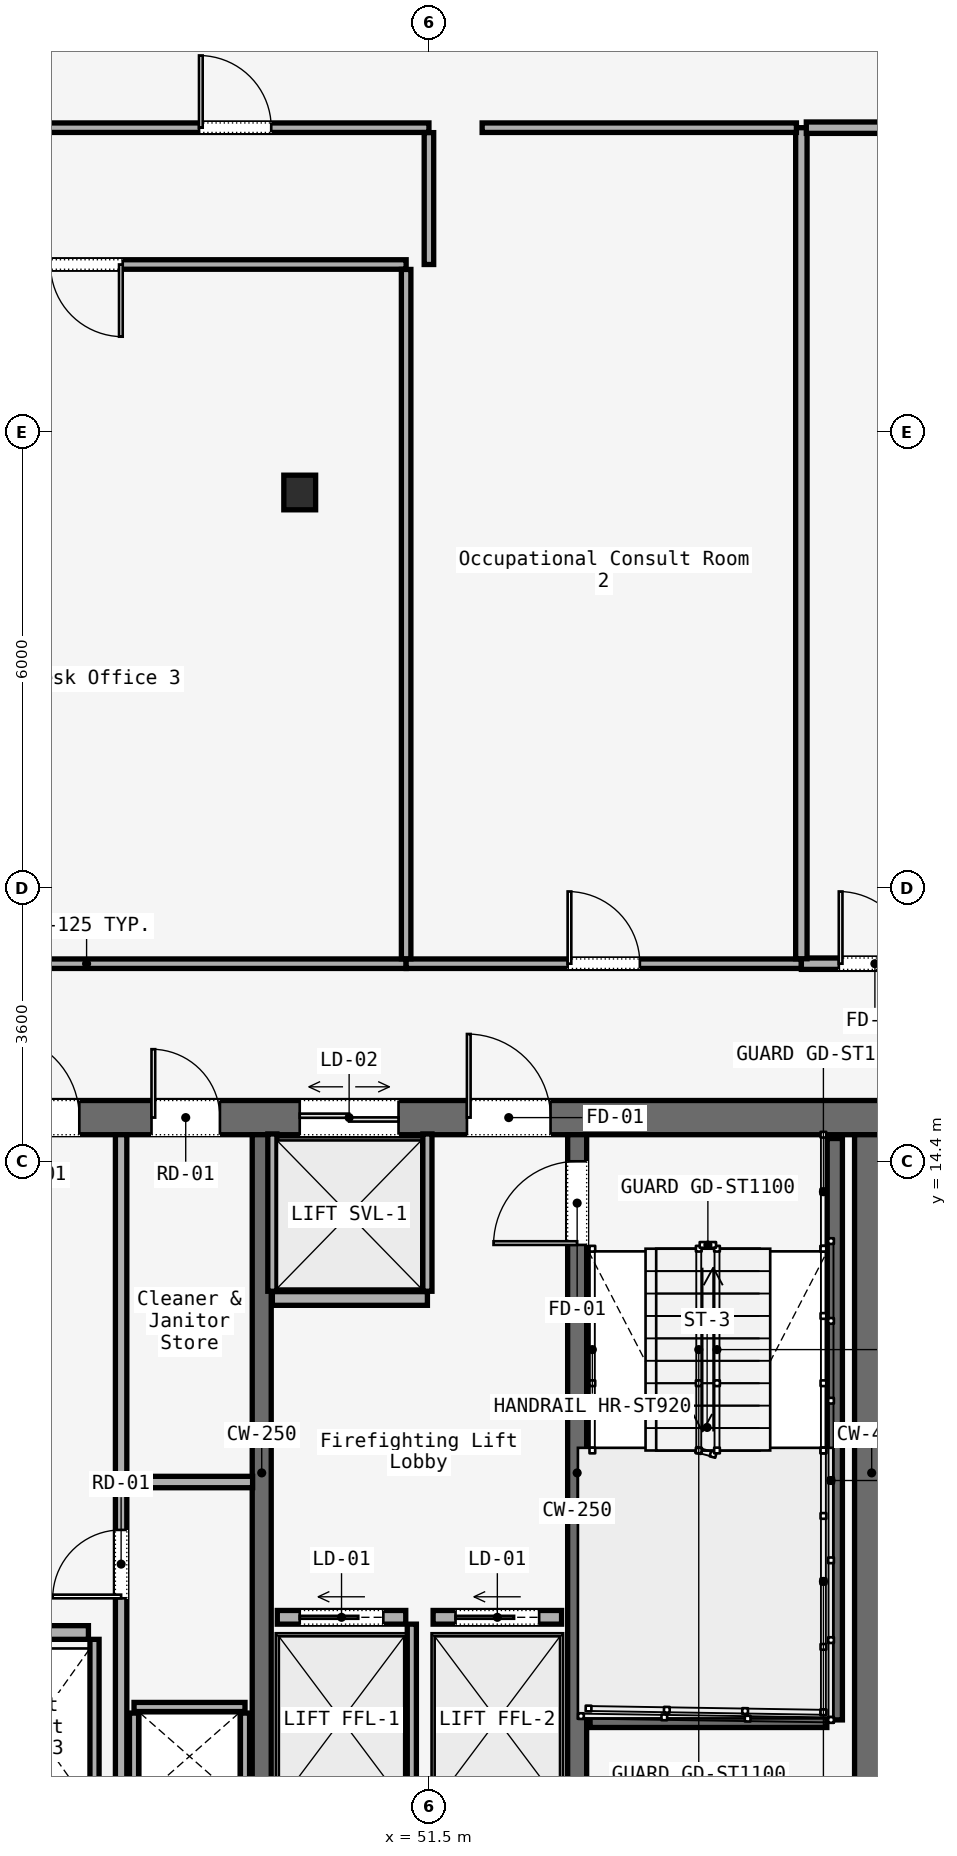
"""IFC4 building model, lengths in metres.
Left out: names, types, materials, properties, quantities, classifications, styles, units other than length and angle.
Written with IfcOpenShell. Run it as: python <this file> out.ifc"""

import sys

from ifc_helpers import new_model, si_unit, direction, frame, frame_2d, origin, origin_2d, place, context, subcontext, project, spatial, rectangle, i_section, extrude, element, fill, save


model = new_model("IFC4")
c1 = context("Model", 3, precision=1e-05, world=origin(), true_north=direction((0.0, 1.0)))
c2 = subcontext(c1, "Body", "Model", "MODEL_VIEW")
j1 = project(units=[si_unit("LENGTHUNIT", "METRE"), si_unit("PLANEANGLEUNIT", "RADIAN")], contexts=[c1])
p1 = place(None, origin())
s1 = spatial("IfcSite", under=j1, at=p1, CompositionType="ELEMENT")
p2 = place(p1, origin())
s2 = spatial("IfcBuilding", under=s1, at=p2, CompositionType="ELEMENT")
p3 = place(p2, frame((0.0, 0.0, 96.8)))
s3 = spatial("IfcBuildingStorey", under=s2, at=p3, CompositionType="ELEMENT", Elevation=96.8)
p4 = place(p3, frame((26.45, 14.975, 0.0), z_axis=(0.0, 0.0, 1.0), x_axis=(1.0, 0.0, 0.0)))
e1 = element("IfcWall", 1, at=p4, inside=s3, PredefinedType="SOLIDWALL", context=c2, shape_type="SweptSolid", body=[
    extrude(rectangle(XDim=31.1, YDim=0.45, at=frame_2d((15.55, 0.0))), origin(), (0.0, 0.0, 1.0), 3.58),
])
p5 = place(p4, frame((1.65, 0.0, 0.0)))
e2 = element("IfcOpeningElement", 2, at=p5, cuts=e1, PredefinedType="OPENING", context=c2, shape_type="SweptSolid", body=[
    extrude(rectangle(XDim=1.1, YDim=2.2, at=frame_2d((0.55, 1.1))), frame((0.0, 0.225, 0.0), z_axis=(0.0, -1.0, 0.0), x_axis=(1.0, 0.0, 0.0)), (0.0, 0.0, 1.0), 0.45),
])
p6 = place(p4, frame((13.65, 0.0, 0.0)))
e3 = element("IfcOpeningElement", 3, at=p6, cuts=e1, PredefinedType="OPENING", context=c2, shape_type="SweptSolid", body=[
    extrude(rectangle(XDim=1.1, YDim=2.2, at=frame_2d((0.55, 1.1))), frame((0.0, 0.225, 0.0), z_axis=(0.0, -1.0, 0.0), x_axis=(1.0, 0.0, 0.0)), (0.0, 0.0, 1.0), 0.45),
])
p7 = place(p4, frame((25.55, 0.0, 0.0)))
e4 = element("IfcOpeningElement", 4, at=p7, cuts=e1, PredefinedType="OPENING", context=c2, shape_type="SweptSolid", body=[
    extrude(rectangle(XDim=1.1, YDim=2.2, at=frame_2d((0.55, 1.1))), frame((0.0, 0.225, 0.0), z_axis=(0.0, -1.0, 0.0), x_axis=(1.0, 0.0, 0.0)), (0.0, 0.0, 1.0), 0.45),
])
p8 = place(p4, frame((10.7, 0.0, 0.0)))
e5 = element("IfcOpeningElement", 5, at=p8, cuts=e1, PredefinedType="OPENING", context=c2, shape_type="SweptSolid", body=[
    extrude(rectangle(XDim=1.4, YDim=2.2, at=frame_2d((0.7, 1.1))), frame((0.0, 0.225, 0.0), z_axis=(0.0, -1.0, 0.0), x_axis=(1.0, 0.0, 0.0)), (0.0, 0.0, 1.0), 0.45),
])
p9 = place(p4, frame((19.35, 0.0, 0.0)))
e6 = element("IfcOpeningElement", 6, at=p9, cuts=e1, PredefinedType="OPENING", context=c2, shape_type="SweptSolid", body=[
    extrude(rectangle(XDim=1.1, YDim=2.2, at=frame_2d((0.55, 1.1))), frame((0.0, 0.225, 0.0), z_axis=(0.0, -1.0, 0.0), x_axis=(1.0, 0.0, 0.0)), (0.0, 0.0, 1.0), 0.45),
])
p10 = place(p4, frame((21.4, 0.0, 0.0)))
e7 = element("IfcOpeningElement", 7, at=p10, cuts=e1, PredefinedType="OPENING", context=c2, shape_type="SweptSolid", body=[
    extrude(rectangle(XDim=0.9, YDim=2.1, at=frame_2d((0.45, 1.05))), frame((0.0, 0.225, 0.0), z_axis=(0.0, -1.0, 0.0), x_axis=(1.0, 0.0, 0.0)), (0.0, 0.0, 1.0), 0.45),
])
p11 = place(p4, frame((23.35, 0.0, 0.0)))
e8 = element("IfcOpeningElement", 8, at=p11, cuts=e1, PredefinedType="OPENING", context=c2, shape_type="SweptSolid", body=[
    extrude(rectangle(XDim=1.3, YDim=2.3, at=frame_2d((0.65, 1.15))), frame((0.0, 0.225, 0.0), z_axis=(0.0, -1.0, 0.0), x_axis=(1.0, 0.0, 0.0)), (0.0, 0.0, 1.0), 0.45),
])
p12 = place(p3, frame((57.325, 5.85, 0.0), z_axis=(0.0, 0.0, 1.0), x_axis=(0.0, 1.0, 0.0)))
e9 = element("IfcWall", 9, at=p12, inside=s3, PredefinedType="SOLIDWALL", context=c2, shape_type="SweptSolid", body=[
    extrude(rectangle(XDim=8.9, YDim=0.45, at=frame_2d((4.45, 0.0))), origin(), (0.0, 0.0, 1.0), 3.58),
])
p13 = place(p3, frame((49.3, 5.85, 0.0), z_axis=(0.0, 0.0, 1.0), x_axis=(0.0, 1.0, 0.0)))
e10 = element("IfcWall", 10, at=p13, inside=s3, PredefinedType="SOLIDWALL", context=c2, shape_type="SweptSolid", body=[
    extrude(rectangle(XDim=8.9, YDim=0.25, at=frame_2d((4.45, 0.0))), origin(), (0.0, 0.0, 1.0), 3.58),
])
p14 = place(p3, frame((53.45, 5.85, 0.0), z_axis=(0.0, 0.0, 1.0), x_axis=(0.0, 1.0, 0.0)))
e11 = element("IfcWall", 11, at=p14, inside=s3, PredefinedType="SOLIDWALL", context=c2, shape_type="SweptSolid", body=[
    extrude(rectangle(XDim=8.9, YDim=0.25, at=frame_2d((4.45, 0.0))), origin(), (0.0, 0.0, 1.0), 3.58),
])
p15 = place(p14, frame((7.45, 0.0, 0.0)))
e12 = element("IfcOpeningElement", 12, at=p15, cuts=e11, PredefinedType="OPENING", context=c2, shape_type="SweptSolid", body=[
    extrude(rectangle(XDim=1.1, YDim=2.2, at=frame_2d((0.55, 1.1))), frame((0.0, 0.125, 0.0), z_axis=(0.0, -1.0, 0.0), x_axis=(1.0, 0.0, 0.0)), (0.0, 0.0, 1.0), 0.25),
])
p16 = place(p3, frame((49.8, 23.2, 0.0), z_axis=(0.0, 0.0, 1.0), x_axis=(1.0, 0.0, 0.0)))
e13 = element("IfcColumn", 13, at=p16, inside=s3, PredefinedType="COLUMN", context=c2, shape_type="SweptSolid", body=[
    extrude(i_section(OverallWidth=0.418, OverallDepth=0.456, WebThickness=0.042, FlangeThickness=0.067, FilletRadius=0.015, at=origin_2d()), origin(), (0.0, 0.0, 1.0), 3.58),
])
p17 = place(p3, frame((56.84, 14.7, 0.0), z_axis=(0.0, 0.0, 1.0), x_axis=(0.0, -1.0, 0.0)))
e14 = element("IfcWall", 14, at=p17, inside=s3, PredefinedType="SOLIDWALL", context=c2, shape_type="SweptSolid", body=[
    extrude(rectangle(XDim=7.65, YDim=0.2, at=frame_2d((3.825, 0.0))), origin(), (0.0, 0.0, 1.0), 3.8),
])
p18 = place(p3, frame((53.62, 7.05, 0.0), z_axis=(0.0, 0.0, 1.0), x_axis=(1.0, 0.0, 0.0)))
e15 = element("IfcWall", 15, at=p18, inside=s3, PredefinedType="SOLIDWALL", context=c2, shape_type="SweptSolid", body=[
    extrude(rectangle(XDim=3.115, YDim=0.2, at=frame_2d((1.558, 0.0))), origin(), (0.0, 0.0, 1.0), 3.8),
])
p19 = place(p3, frame((47.62, 7.22, 0.0), z_axis=(0.0, 0.0, 1.0), x_axis=(1.0, 0.0, 0.0)))
e16 = element("IfcWall", 16, at=p19, inside=s3, PredefinedType="SOLIDWALL", context=c2, shape_type="SweptSolid", body=[
    extrude(rectangle(XDim=1.46, YDim=0.12, at=frame_2d((0.73, 0.0))), origin(), (0.0, 0.0, 1.0), 2.95),
])
for number, where, z_axis, x_axis in (
    (17, (47.62, 6.0, 0.0), (0.0, 0.0, 1.0), (0.0, 1.0, 0.0)),
    (18, (49.08, 6.0, 0.0), (0.0, 0.0, 1.0), (0.0, 1.0, 0.0)),
):
    element("IfcWall", number, at=place(p3, frame(where, z_axis=z_axis, x_axis=x_axis)), inside=s3, PredefinedType="SOLIDWALL", context=c2, shape_type="SweptSolid", body=[
        extrude(rectangle(XDim=1.14, YDim=0.12, at=frame_2d((0.57, 0.0))), origin(), (0.0, 0.0, 1.0), 2.95),
    ])
p20 = place(p3, frame((47.45, 5.9, 0.0), z_axis=(0.0, 0.0, 1.0), x_axis=(0.0, 1.0, 0.0)))
e19 = element("IfcWall", 19, at=p20, inside=s3, PredefinedType="PARTITIONING", context=c2, shape_type="SweptSolid", body=[
    extrude(rectangle(XDim=8.85, YDim=0.15, at=frame_2d((4.425, 0.0))), origin(), (0.0, 0.0, 1.0), 2.95),
])
p21 = place(p20, frame((2.75, 0.0, 0.0)))
e20 = element("IfcOpeningElement", 20, at=p21, cuts=e19, PredefinedType="OPENING", context=c2, shape_type="SweptSolid", body=[
    extrude(rectangle(XDim=0.9, YDim=2.1, at=frame_2d((0.45, 1.05))), frame((0.0, 0.075, 0.0), z_axis=(0.0, -1.0, 0.0), x_axis=(1.0, 0.0, 0.0)), (0.0, 0.0, 1.0), 0.15),
])
p22 = place(p3, frame((47.45, 10.18, 0.0), z_axis=(0.0, 0.0, 1.0), x_axis=(1.0, 0.0, 0.0)))
e21 = element("IfcWall", 21, at=p22, inside=s3, PredefinedType="PARTITIONING", context=c2, shape_type="SweptSolid", body=[
    extrude(rectangle(XDim=1.73, YDim=0.15, at=frame_2d((0.865, 0.0))), origin(), (0.0, 0.0, 1.0), 2.95),
])
p23 = place(p3, frame((45.58, 8.2, 0.0), z_axis=(0.0, 0.0, 1.0), x_axis=(1.0, 0.0, 0.0)))
e22 = element("IfcWall", 22, at=p23, inside=s3, PredefinedType="SOLIDWALL", context=c2, shape_type="SweptSolid", body=[
    extrude(rectangle(XDim=1.44, YDim=0.18, at=frame_2d((0.72, 0.0))), origin(), (0.0, 0.0, 1.0), 2.95),
])
p24 = place(p3, frame((47.1, 5.93, 0.0), z_axis=(0.0, 0.0, 1.0), x_axis=(0.0, 1.0, 0.0)))
e23 = element("IfcWall", 23, at=p24, inside=s3, PredefinedType="SOLIDWALL", context=c2, shape_type="SweptSolid", body=[
    extrude(rectangle(XDim=2.18, YDim=0.12, at=frame_2d((1.09, 0.0))), origin(), (0.0, 0.0, 1.0), 2.95),
])
p25 = place(p3, frame((49.505, 8.4, 0.0), z_axis=(0.0, 0.0, 1.0), x_axis=(1.0, 0.0, 0.0)))
e24 = element("IfcWall", 24, at=p25, inside=s3, PredefinedType="SOLIDWALL", context=c2, shape_type="SweptSolid", body=[
    extrude(rectangle(XDim=1.69, YDim=0.18, at=frame_2d((0.845, 0.0))), origin(), (0.0, 0.0, 1.0), 2.95),
])
p26 = place(p25, frame((0.295, 0.0, 0.0)))
e25 = element("IfcOpeningElement", 25, at=p26, cuts=e24, PredefinedType="OPENING", context=c2, shape_type="SweptSolid", body=[
    extrude(rectangle(XDim=1.1, YDim=2.2, at=frame_2d((0.55, 1.1))), frame((0.0, 0.09, 0.0), z_axis=(0.0, -1.0, 0.0), x_axis=(1.0, 0.0, 0.0)), (0.0, 0.0, 1.0), 0.18),
])
p27 = place(p3, frame((51.275, 5.93, 0.0), z_axis=(0.0, 0.0, 1.0), x_axis=(0.0, 1.0, 0.0)))
e26 = element("IfcWall", 26, at=p27, inside=s3, PredefinedType="SOLIDWALL", context=c2, shape_type="SweptSolid", body=[
    extrude(rectangle(XDim=2.38, YDim=0.12, at=frame_2d((1.19, 0.0))), origin(), (0.0, 0.0, 1.0), 2.95),
])
p28 = place(p3, frame((51.555, 8.4, 0.0), z_axis=(0.0, 0.0, 1.0), x_axis=(1.0, 0.0, 0.0)))
e27 = element("IfcWall", 27, at=p28, inside=s3, PredefinedType="SOLIDWALL", context=c2, shape_type="SweptSolid", body=[
    extrude(rectangle(XDim=1.69, YDim=0.18, at=frame_2d((0.845, 0.0))), origin(), (0.0, 0.0, 1.0), 2.95),
])
p29 = place(p28, frame((0.295, 0.0, 0.0)))
e28 = element("IfcOpeningElement", 28, at=p29, cuts=e27, PredefinedType="OPENING", context=c2, shape_type="SweptSolid", body=[
    extrude(rectangle(XDim=1.1, YDim=2.2, at=frame_2d((0.55, 1.1))), frame((0.0, 0.09, 0.0), z_axis=(0.0, -1.0, 0.0), x_axis=(1.0, 0.0, 0.0)), (0.0, 0.0, 1.0), 0.18),
])
p30 = place(p3, frame((49.44, 12.595, 0.0), z_axis=(0.0, 0.0, 1.0), x_axis=(1.0, 0.0, 0.0)))
e29 = element("IfcWall", 29, at=p30, inside=s3, PredefinedType="SOLIDWALL", context=c2, shape_type="SweptSolid", body=[
    extrude(rectangle(XDim=2.04, YDim=0.18, at=frame_2d((1.02, 0.0))), origin(), (0.0, 0.0, 1.0), 2.95),
])
for number, where, z_axis, x_axis in (
    (30, (49.44, 12.69, 0.0), (0.0, 0.0, 1.0), (0.0, 1.0, 0.0)),
    (31, (51.48, 12.69, 0.0), (0.0, 0.0, 1.0), (0.0, 1.0, 0.0)),
):
    element("IfcWall", number, at=place(p3, frame(where, z_axis=z_axis, x_axis=x_axis)), inside=s3, PredefinedType="SOLIDWALL", context=c2, shape_type="SweptSolid", body=[
        extrude(rectangle(XDim=2.07, YDim=0.12, at=frame_2d((1.035, 0.0))), origin(), (0.0, 0.0, 1.0), 2.95),
    ])
p31 = place(p3, frame((46.4, 28.0, 0.0), z_axis=(0.0, 0.0, 1.0), x_axis=(1.0, 0.0, 0.0)))
e32 = element("IfcWall", 32, at=p31, inside=s3, PredefinedType="PARTITIONING", context=c2, shape_type="SweptSolid", body=[
    extrude(rectangle(XDim=5.1, YDim=0.125, at=frame_2d((2.55, 0.0))), origin(), (0.0, 0.0, 1.0), 2.95),
])
p32 = place(p31, frame((2.075, 0.0, 0.0)))
e33 = element("IfcOpeningElement", 33, at=p32, cuts=e32, PredefinedType="OPENING", context=c2, shape_type="SweptSolid", body=[
    extrude(rectangle(XDim=0.95, YDim=2.2, at=frame_2d((0.475, 1.1))), frame((0.0, 0.062, 0.0), z_axis=(0.0, -1.0, 0.0), x_axis=(1.0, 0.0, 0.0)), (0.0, 0.0, 1.0), 0.125),
])
p33 = place(p3, frame((51.5, 27.935, 0.0), z_axis=(0.0, 0.0, 1.0), x_axis=(0.0, -1.0, 0.0)))
e34 = element("IfcWall", 34, at=p33, inside=s3, PredefinedType="PARTITIONING", context=c2, shape_type="SweptSolid", body=[
    extrude(rectangle(XDim=1.735, YDim=0.125, at=frame_2d((0.868, 0.0))), origin(), (0.0, 0.0, 1.0), 2.95),
])
p34 = place(p3, frame((51.2, 26.2, 0.0), z_axis=(0.0, 0.0, 1.0), x_axis=(-1.0, 0.0, 0.0)))
e35 = element("IfcWall", 35, at=p34, inside=s3, PredefinedType="PARTITIONING", context=c2, shape_type="SweptSolid", body=[
    extrude(rectangle(XDim=8.408, YDim=0.125, at=frame_2d((4.204, 0.0))), origin(), (0.0, 0.0, 1.0), 2.95),
])
p35 = place(p34, frame((3.729, 0.0, 0.0)))
e36 = element("IfcOpeningElement", 36, at=p35, cuts=e35, PredefinedType="OPENING", context=c2, shape_type="SweptSolid", body=[
    extrude(rectangle(XDim=0.95, YDim=2.2, at=frame_2d((0.475, 1.1))), frame((0.0, 0.062, 0.0), z_axis=(0.0, -1.0, 0.0), x_axis=(1.0, 0.0, 0.0)), (0.0, 0.0, 1.0), 0.125),
])
p36 = place(p3, frame((42.792, 17.0, 0.0), z_axis=(0.0, 0.0, 1.0), x_axis=(1.0, 0.0, 0.0)))
e37 = element("IfcWall", 37, at=p36, inside=s3, PredefinedType="PARTITIONING", context=c2, shape_type="SweptSolid", body=[
    extrude(rectangle(XDim=8.408, YDim=0.125, at=frame_2d((4.204, 0.0))), origin(), (0.0, 0.0, 1.0), 2.95),
])
p37 = place(p3, frame((51.2, 17.0, 0.0), z_axis=(0.0, 0.0, 1.0), x_axis=(1.0, 0.0, 0.0)))
e38 = element("IfcWall", 38, at=p37, inside=s3, PredefinedType="PARTITIONING", context=c2, shape_type="SweptSolid", body=[
    extrude(rectangle(XDim=5.2, YDim=0.125, at=frame_2d((2.6, 0.0))), origin(), (0.0, 0.0, 1.0), 2.95),
])
p38 = place(p37, frame((2.125, 0.0, 0.0)))
e39 = element("IfcOpeningElement", 39, at=p38, cuts=e38, PredefinedType="OPENING", context=c2, shape_type="SweptSolid", body=[
    extrude(rectangle(XDim=0.95, YDim=2.2, at=frame_2d((0.475, 1.1))), frame((0.0, 0.062, 0.0), z_axis=(0.0, -1.0, 0.0), x_axis=(1.0, 0.0, 0.0)), (0.0, 0.0, 1.0), 0.125),
])
p39 = place(p3, frame((56.4, 17.0, 0.0), z_axis=(0.0, 0.0, 1.0), x_axis=(1.0, 0.0, 0.0)))
e40 = element("IfcWall", 40, at=p39, inside=s3, PredefinedType="PARTITIONING", context=c2, shape_type="SweptSolid", body=[
    extrude(rectangle(XDim=1.935, YDim=0.15, at=frame_2d((0.968, 0.0))), origin(), (0.0, 0.0, 1.0), 2.95),
])
p40 = place(p39, frame((0.492, 0.0, 0.0)))
e41 = element("IfcOpeningElement", 41, at=p40, cuts=e40, PredefinedType="OPENING", context=c2, shape_type="SweptSolid", body=[
    extrude(rectangle(XDim=0.95, YDim=2.2, at=frame_2d((0.475, 1.1))), frame((0.0, 0.075, 0.0), z_axis=(0.0, -1.0, 0.0), x_axis=(1.0, 0.0, 0.0)), (0.0, 0.0, 1.0), 0.15),
])
p41 = place(p3, frame((56.4, 17.065, 0.0), z_axis=(0.0, 0.0, 1.0), x_axis=(0.0, 1.0, 0.0)))
e42 = element("IfcWall", 42, at=p41, inside=s3, PredefinedType="PARTITIONING", context=c2, shape_type="SweptSolid", body=[
    extrude(rectangle(XDim=10.935, YDim=0.15, at=frame_2d((5.468, 0.0))), origin(), (0.0, 0.0, 1.0), 2.95),
])
p42 = place(p3, frame((56.465, 28.0, 0.0), z_axis=(0.0, 0.0, 1.0), x_axis=(1.0, 0.0, 0.0)))
e43 = element("IfcWall", 43, at=p42, inside=s3, PredefinedType="PARTITIONING", context=c2, shape_type="SweptSolid", body=[
    extrude(rectangle(XDim=2.818, YDim=0.15, at=frame_2d((1.409, 0.0))), origin(), (0.0, 0.0, 1.0), 2.95),
])
p43 = place(p3, frame((51.2, 26.135, 0.0), z_axis=(0.0, 0.0, 1.0), x_axis=(0.0, -1.0, 0.0)))
e44 = element("IfcWall", 44, at=p43, inside=s3, PredefinedType="PARTITIONING", context=c2, shape_type="SweptSolid", body=[
    extrude(rectangle(XDim=9.07, YDim=0.125, at=frame_2d((4.535, 0.0))), origin(), (0.0, 0.0, 1.0), 2.95),
])
p44 = place(p3, frame((52.2, 28.0, 0.0), z_axis=(0.0, 0.0, 1.0), x_axis=(1.0, 0.0, 0.0)))
e45 = element("IfcWall", 45, at=p44, inside=s3, PredefinedType="PARTITIONING", context=c2, shape_type="SweptSolid", body=[
    extrude(rectangle(XDim=4.135, YDim=0.125, at=frame_2d((2.067, 0.0))), origin(), (0.0, 0.0, 1.0), 2.95),
])
p45 = place(p7, origin())
e46 = element("IfcDoor", 46, at=p45, inside=s3, OperationType="SINGLE_SWING_RIGHT", PredefinedType="DOOR", context=c2, shape_type="SweptSolid", body=[
    extrude(rectangle(XDim=1.1, YDim=2.2, at=frame_2d((0.55, 1.1))), frame((0.0, 0.025, 0.0), z_axis=(0.0, -1.0, 0.0), x_axis=(1.0, 0.0, 0.0)), (0.0, 0.0, 1.0), 0.05),
])
fill(e4, e46)
p46 = place(p9, origin())
e47 = element("IfcDoor", 47, at=p46, inside=s3, OperationType="SINGLE_SWING_LEFT", PredefinedType="DOOR", context=c2, shape_type="SweptSolid", body=[
    extrude(rectangle(XDim=1.1, YDim=2.2, at=frame_2d((0.55, 1.1))), frame((0.0, 0.025, 0.0), z_axis=(0.0, -1.0, 0.0), x_axis=(1.0, 0.0, 0.0)), (0.0, 0.0, 1.0), 0.05),
])
fill(e6, e47)
p47 = place(p10, origin())
e48 = element("IfcDoor", 48, at=p47, inside=s3, OperationType="SINGLE_SWING_LEFT", PredefinedType="DOOR", context=c2, shape_type="SweptSolid", body=[
    extrude(rectangle(XDim=0.9, YDim=2.1, at=frame_2d((0.45, 1.05))), frame((0.0, 0.025, 0.0), z_axis=(0.0, -1.0, 0.0), x_axis=(1.0, 0.0, 0.0)), (0.0, 0.0, 1.0), 0.05),
])
fill(e7, e48)
p48 = place(p15, origin())
e49 = element("IfcDoor", 49, at=p48, inside=s3, OperationType="SINGLE_SWING_LEFT", PredefinedType="DOOR", context=c2, shape_type="SweptSolid", body=[
    extrude(rectangle(XDim=1.1, YDim=2.2, at=frame_2d((0.55, 1.1))), frame((0.0, 0.025, 0.0), z_axis=(0.0, -1.0, 0.0), x_axis=(1.0, 0.0, 0.0)), (0.0, 0.0, 1.0), 0.05),
])
fill(e12, e49)
p49 = place(p21, origin())
e50 = element("IfcDoor", 50, at=p49, inside=s3, OperationType="SINGLE_SWING_RIGHT", PredefinedType="DOOR", context=c2, shape_type="SweptSolid", body=[
    extrude(rectangle(XDim=0.9, YDim=2.1, at=frame_2d((0.45, 1.05))), frame((0.0, 0.025, 0.0), z_axis=(0.0, -1.0, 0.0), x_axis=(1.0, 0.0, 0.0)), (0.0, 0.0, 1.0), 0.05),
])
fill(e20, e50)
p50 = place(p26, origin())
e51 = element("IfcDoor", 51, at=p50, inside=s3, OperationType="SLIDING_TO_LEFT", PredefinedType="DOOR", context=c2, shape_type="SweptSolid", body=[
    extrude(rectangle(XDim=1.1, YDim=2.2, at=frame_2d((0.55, 1.1))), frame((0.0, 0.025, 0.0), z_axis=(0.0, -1.0, 0.0), x_axis=(1.0, 0.0, 0.0)), (0.0, 0.0, 1.0), 0.05),
])
fill(e25, e51)
p51 = place(p29, origin())
e52 = element("IfcDoor", 52, at=p51, inside=s3, OperationType="SLIDING_TO_LEFT", PredefinedType="DOOR", context=c2, shape_type="SweptSolid", body=[
    extrude(rectangle(XDim=1.1, YDim=2.2, at=frame_2d((0.55, 1.1))), frame((0.0, 0.025, 0.0), z_axis=(0.0, -1.0, 0.0), x_axis=(1.0, 0.0, 0.0)), (0.0, 0.0, 1.0), 0.05),
])
fill(e28, e52)
p52 = place(p11, origin())
e53 = element("IfcDoor", 53, at=p52, inside=s3, OperationType="DOUBLE_DOOR_SLIDING", PredefinedType="DOOR", context=c2, shape_type="SweptSolid", body=[
    extrude(rectangle(XDim=1.3, YDim=2.3, at=frame_2d((0.65, 1.15))), frame((0.0, 0.025, 0.0), z_axis=(0.0, -1.0, 0.0), x_axis=(1.0, 0.0, 0.0)), (0.0, 0.0, 1.0), 0.05),
])
fill(e8, e53)
p53 = place(p40, origin())
e54 = element("IfcDoor", 54, at=p53, inside=s3, OperationType="SINGLE_SWING_RIGHT", PredefinedType="DOOR", context=c2, shape_type="SweptSolid", body=[
    extrude(rectangle(XDim=0.95, YDim=2.2, at=frame_2d((0.475, 1.1))), frame((0.0, 0.025, 0.0), z_axis=(0.0, -1.0, 0.0), x_axis=(1.0, 0.0, 0.0)), (0.0, 0.0, 1.0), 0.05),
])
fill(e41, e54)
p54 = place(p35, origin())
e55 = element("IfcDoor", 55, at=p54, inside=s3, OperationType="SINGLE_SWING_LEFT", PredefinedType="DOOR", context=c2, shape_type="SweptSolid", body=[
    extrude(rectangle(XDim=0.95, YDim=2.2, at=frame_2d((0.475, 1.1))), frame((0.0, 0.025, 0.0), z_axis=(0.0, -1.0, 0.0), x_axis=(1.0, 0.0, 0.0)), (0.0, 0.0, 1.0), 0.05),
])
fill(e36, e55)
p55 = place(p38, origin())
e56 = element("IfcDoor", 56, at=p55, inside=s3, OperationType="SINGLE_SWING_RIGHT", PredefinedType="DOOR", context=c2, shape_type="SweptSolid", body=[
    extrude(rectangle(XDim=0.95, YDim=2.2, at=frame_2d((0.475, 1.1))), frame((0.0, 0.025, 0.0), z_axis=(0.0, -1.0, 0.0), x_axis=(1.0, 0.0, 0.0)), (0.0, 0.0, 1.0), 0.05),
])
fill(e39, e56)
p56 = place(p32, origin())
e57 = element("IfcDoor", 57, at=p56, inside=s3, OperationType="SINGLE_SWING_LEFT", PredefinedType="DOOR", context=c2, shape_type="SweptSolid", body=[
    extrude(rectangle(XDim=0.95, YDim=2.2, at=frame_2d((0.475, 1.1))), frame((0.0, 0.025, 0.0), z_axis=(0.0, -1.0, 0.0), x_axis=(1.0, 0.0, 0.0)), (0.0, 0.0, 1.0), 0.05),
])
fill(e33, e57)
save(model, sys.argv[1])
